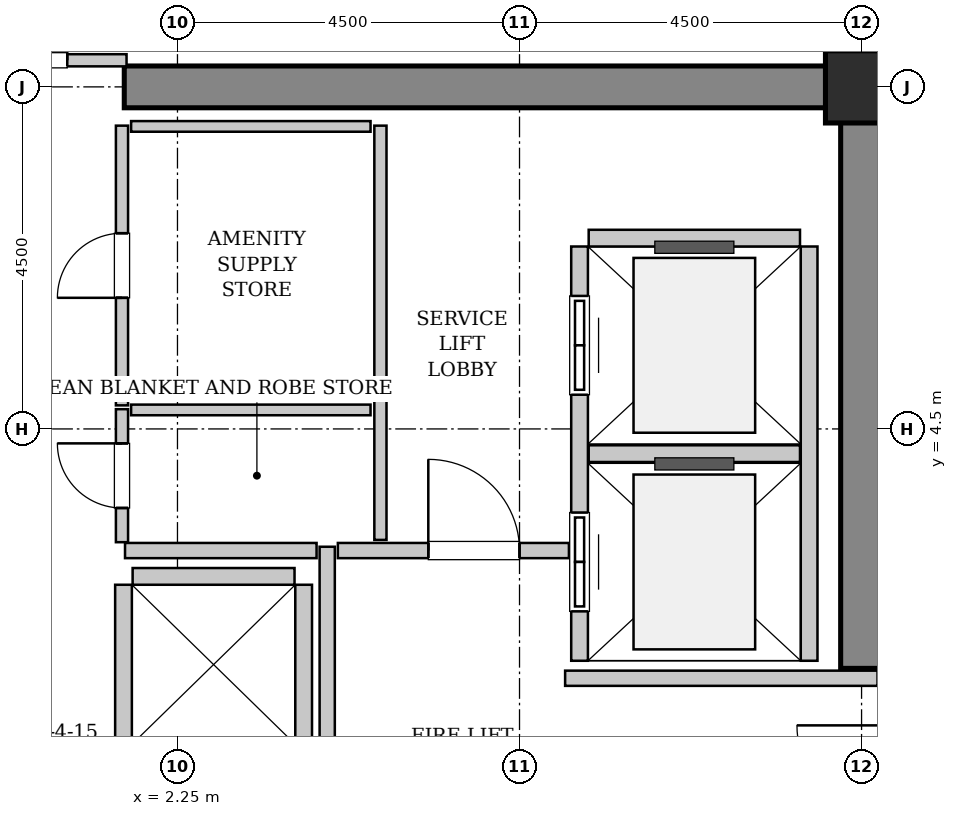
"""IFC4 building model, lengths in metres.
Left out: names, types, materials, properties, quantities, classifications, styles, units other than length and angle.
Written with IfcOpenShell. Run it as: python <this file> out.ifc"""

import sys

from ifc_helpers import new_model, si_unit, direction, frame, frame_2d, origin, origin_2d, place, context, subcontext, project, spatial, rectangle, hollow_rectangle, extrude, source, transform, mapped, element, fill, save


model = new_model("IFC4")
c1 = context("Model", 3, precision=1e-05, world=origin(), true_north=direction((0.0, 1.0)))
c2 = subcontext(c1, "Body", "Model", "MODEL_VIEW")
j1 = project(units=[si_unit("LENGTHUNIT", "METRE"), si_unit("PLANEANGLEUNIT", "RADIAN")], contexts=[c1])
p1 = place(None, origin())
s1 = spatial("IfcSite", under=j1, at=p1, CompositionType="ELEMENT")
p2 = place(p1, origin())
s2 = spatial("IfcBuilding", under=s1, at=p2, CompositionType="ELEMENT")
p3 = place(p2, frame((0.0, 0.0, 171.6)))
s3 = spatial("IfcBuildingStorey", under=s2, at=p3, CompositionType="ELEMENT", Elevation=171.6)
m1 = source(origin(), c2, "Body", "SweptSolid", [
    extrude(rectangle(XDim=9.975, YDim=0.55, at=frame_2d((4.987, 0.0))), origin(), (0.0, 0.0, 1.0), 3.8),
])
p4 = place(p3, frame((1.55, 9.0, 0.0), z_axis=(0.0, 0.0, 1.0), x_axis=(1.0, 0.0, 0.0)))
e1 = element("IfcWall", 1, at=p4, inside=s3, PredefinedType="SHEAR", context=c2, shape_type="MappedRepresentation", body=[
    mapped(m1, transform((0.0, 0.0, 0.0), x_axis=(1.0, 0.0, 0.0), y_axis=(0.0, 1.0, 0.0), z_axis=(0.0, 0.0, 1.0), scale=1.0)),
])
m2 = source(origin(), c2, "Body", "SweptSolid", [
    extrude(rectangle(XDim=7.375, YDim=0.55, at=frame_2d((3.688, 0.0))), origin(), (0.0, 0.0, 1.0), 3.8),
])
p5 = place(p3, frame((11.25, 1.35, 0.0), z_axis=(0.0, 0.0, 1.0), x_axis=(0.0, 1.0, 0.0)))
e2 = element("IfcWall", 2, at=p5, inside=s3, PredefinedType="SHEAR", context=c2, shape_type="MappedRepresentation", body=[
    mapped(m2, transform((0.0, 0.0, 0.0), x_axis=(1.0, 0.0, 0.0), y_axis=(0.0, 1.0, 0.0), z_axis=(0.0, 0.0, 1.0), scale=1.0)),
])
m3 = source(origin(), c2, "Body", "SweptSolid", [
    extrude(hollow_rectangle(XDim=0.95, YDim=0.95, WallThickness=0.045, InnerFilletRadius=0.045, OuterFilletRadius=0.09, at=origin_2d()), origin(), (0.0, 0.0, 1.0), 3.8),
])
p6 = place(p3, frame((11.25, 9.0, 0.0), z_axis=(0.0, 0.0, 1.0), x_axis=(1.0, 0.0, 0.0)))
e3 = element("IfcColumn", 3, at=p6, inside=s3, PredefinedType="COLUMN", context=c2, shape_type="MappedRepresentation", body=[
    mapped(m3, transform((0.0, 0.0, 0.0), x_axis=(1.0, 0.0, 0.0), y_axis=(0.0, 1.0, 0.0), z_axis=(0.0, 0.0, 1.0), scale=1.0)),
])
m4 = source(origin(), c2, "Body", "SweptSolid", [
    extrude(rectangle(XDim=5.45, YDim=0.22, at=frame_2d((2.725, 0.0))), origin(), (0.0, 0.0, 1.0), 3.535),
])
p7 = place(p3, frame((7.54, 6.9, 0.0), z_axis=(0.0, 0.0, 1.0), x_axis=(0.0, -1.0, 0.0)))
e4 = element("IfcWall", 4, at=p7, inside=s3, PredefinedType="SOLIDWALL", context=c2, shape_type="MappedRepresentation", body=[
    mapped(m4, transform((0.0, 0.0, 0.0), x_axis=(1.0, 0.0, 0.0), y_axis=(0.0, 1.0, 0.0), z_axis=(0.0, 0.0, 1.0), scale=1.0)),
])
p8 = place(p7, frame((3.5, 0.0, 0.0)))
e5 = element("IfcOpeningElement", 5, at=p8, cuts=e4, PredefinedType="OPENING", context=c2, shape_type="SweptSolid", body=[
    extrude(rectangle(XDim=1.3, YDim=2.3, at=frame_2d((0.65, 1.15))), frame((0.0, 0.12, 0.0), z_axis=(0.0, -1.0, 0.0), x_axis=(1.0, 0.0, 0.0)), (0.0, 0.0, 1.0), 0.24),
])
p9 = place(p7, frame((0.65, 0.0, 0.0)))
e6 = element("IfcOpeningElement", 6, at=p9, cuts=e4, PredefinedType="OPENING", context=c2, shape_type="SweptSolid", body=[
    extrude(rectangle(XDim=1.3, YDim=2.3, at=frame_2d((0.65, 1.15))), frame((0.0, 0.12, 0.0), z_axis=(0.0, -1.0, 0.0), x_axis=(1.0, 0.0, 0.0)), (0.0, 0.0, 1.0), 0.24),
])
p10 = place(p3, frame((10.56, 1.45, 0.0), z_axis=(0.0, 0.0, 1.0), x_axis=(0.0, 1.0, 0.0)))
e7 = element("IfcWall", 7, at=p10, inside=s3, PredefinedType="SOLIDWALL", context=c2, shape_type="MappedRepresentation", body=[
    mapped(m4, transform((0.0, 0.0, 0.0), x_axis=(1.0, 0.0, 0.0), y_axis=(0.0, 1.0, 0.0), z_axis=(0.0, 0.0, 1.0), scale=1.0)),
])
m5 = source(origin(), c2, "Body", "SweptSolid", [
    extrude(rectangle(XDim=2.78, YDim=0.22, at=frame_2d((1.39, 0.0))), origin(), (0.0, 0.0, 1.0), 3.535),
])
for number, where, z_axis, x_axis in (
    (8, (7.66, 4.175, 0.0), (0.0, 0.0, 1.0), (1.0, 0.0, 0.0)),
    (9, (10.44, 7.01, 0.0), (0.0, 0.0, 1.0), (-1.0, 0.0, 0.0)),
):
    element("IfcWall", number, at=place(p3, frame(where, z_axis=z_axis, x_axis=x_axis)), inside=s3, PredefinedType="SOLIDWALL", context=c2, shape_type="MappedRepresentation", body=[
        mapped(m5, transform((0.0, 0.0, 0.0), x_axis=(1.0, 0.0, 0.0), y_axis=(0.0, 1.0, 0.0), z_axis=(0.0, 0.0, 1.0), scale=1.0)),
    ])
m6 = source(origin(), c2, "Body", "SweptSolid", [
    extrude(rectangle(XDim=4.9, YDim=0.22, at=frame_2d((2.45, 0.0))), origin(), (0.0, 0.0, 1.0), 3.535),
])
for number, where, z_axis, x_axis in (
    (10, (1.54, 2.45, 0.0), (0.0, 0.0, 1.0), (0.0, -1.0, 0.0)),
    (11, (3.91, -2.45, 0.0), (0.0, 0.0, 1.0), (0.0, 1.0, 0.0)),
):
    element("IfcWall", number, at=place(p3, frame(where, z_axis=z_axis, x_axis=x_axis)), inside=s3, PredefinedType="SOLIDWALL", context=c2, shape_type="MappedRepresentation", body=[
        mapped(m6, transform((0.0, 0.0, 0.0), x_axis=(1.0, 0.0, 0.0), y_axis=(0.0, 1.0, 0.0), z_axis=(0.0, 0.0, 1.0), scale=1.0)),
    ])
m7 = source(origin(), c2, "Body", "SweptSolid", [
    extrude(rectangle(XDim=2.13, YDim=0.22, at=frame_2d((1.065, 0.0))), origin(), (0.0, 0.0, 1.0), 3.535),
])
p11 = place(p3, frame((3.79, 2.56, 0.0), z_axis=(0.0, 0.0, 1.0), x_axis=(-1.0, 0.0, 0.0)))
e12 = element("IfcWall", 12, at=p11, inside=s3, PredefinedType="SOLIDWALL", context=c2, shape_type="MappedRepresentation", body=[
    mapped(m7, transform((0.0, 0.0, 0.0), x_axis=(1.0, 0.0, 0.0), y_axis=(0.0, 1.0, 0.0), z_axis=(0.0, 0.0, 1.0), scale=1.0)),
])
m8 = source(origin(), c2, "Body", "SweptSolid", [
    extrude(rectangle(XDim=5.9, YDim=0.2, at=frame_2d((2.95, 0.0))), origin(), (0.0, 0.0, 1.0), 3.535),
])
p12 = place(p3, frame((4.22, -2.95, 0.0), z_axis=(0.0, 0.0, 1.0), x_axis=(0.0, 1.0, 0.0)))
e13 = element("IfcWall", 13, at=p12, inside=s3, PredefinedType="PARTITIONING", context=c2, shape_type="MappedRepresentation", body=[
    mapped(m8, transform((0.0, 0.0, 0.0), x_axis=(1.0, 0.0, 0.0), y_axis=(0.0, 1.0, 0.0), z_axis=(0.0, 0.0, 1.0), scale=1.0)),
])
m9 = source(origin(), c2, "Body", "SweptSolid", [
    extrude(rectangle(XDim=2.52, YDim=0.2, at=frame_2d((1.26, 0.0))), origin(), (0.0, 0.0, 1.0), 3.535),
])
p13 = place(p3, frame((1.56, 2.9, 0.0), z_axis=(0.0, 0.0, 1.0), x_axis=(1.0, 0.0, 0.0)))
e14 = element("IfcWall", 14, at=p13, inside=s3, PredefinedType="PARTITIONING", context=c2, shape_type="MappedRepresentation", body=[
    mapped(m9, transform((0.0, 0.0, 0.0), x_axis=(1.0, 0.0, 0.0), y_axis=(0.0, 1.0, 0.0), z_axis=(0.0, 0.0, 1.0), scale=1.0)),
])
m10 = source(origin(), c2, "Body", "SweptSolid", [
    extrude(rectangle(XDim=3.04, YDim=0.2, at=frame_2d((1.52, 0.0))), origin(), (0.0, 0.0, 1.0), 3.535),
])
p14 = place(p3, frame((4.36, 2.9, 0.0), z_axis=(0.0, 0.0, 1.0), x_axis=(1.0, 0.0, 0.0)))
e15 = element("IfcWall", 15, at=p14, inside=s3, PredefinedType="PARTITIONING", context=c2, shape_type="MappedRepresentation", body=[
    mapped(m10, transform((0.0, 0.0, 0.0), x_axis=(1.0, 0.0, 0.0), y_axis=(0.0, 1.0, 0.0), z_axis=(0.0, 0.0, 1.0), scale=1.0)),
])
p15 = place(p14, frame((1.19, 0.0, 0.0)))
e16 = element("IfcOpeningElement", 16, at=p15, cuts=e15, PredefinedType="OPENING", context=c2, shape_type="SweptSolid", body=[
    extrude(rectangle(XDim=1.2, YDim=2.15, at=frame_2d((0.6, 1.075))), frame((0.0, 0.11, 0.0), z_axis=(0.0, -1.0, 0.0), x_axis=(1.0, 0.0, 0.0)), (0.0, 0.0, 1.0), 0.22),
])
m11 = source(origin(), c2, "Body", "SweptSolid", [
    extrude(rectangle(XDim=4.11, YDim=0.2, at=frame_2d((2.055, 0.0))), origin(), (0.0, 0.0, 1.0), 3.535),
])
p16 = place(p3, frame((7.35, 1.22, 0.0), z_axis=(0.0, 0.0, 1.0), x_axis=(1.0, 0.0, 0.0)))
e17 = element("IfcWall", 17, at=p16, inside=s3, PredefinedType="PARTITIONING", context=c2, shape_type="MappedRepresentation", body=[
    mapped(m11, transform((0.0, 0.0, 0.0), x_axis=(1.0, 0.0, 0.0), y_axis=(0.0, 1.0, 0.0), z_axis=(0.0, 0.0, 1.0), scale=1.0)),
])
m12 = source(origin(), c2, "Body", "SweptSolid", [
    extrude(rectangle(XDim=3.16, YDim=0.16, at=frame_2d((1.58, 0.0))), origin(), (0.0, 0.0, 1.0), 2.425),
])
p17 = place(p3, frame((-1.58, 9.35, 0.0), z_axis=(0.0, 0.0, 1.0), x_axis=(1.0, 0.0, 0.0)))
e18 = element("IfcWall", 18, at=p17, inside=s3, PredefinedType="PARTITIONING", context=c2, shape_type="MappedRepresentation", body=[
    mapped(m12, transform((0.0, 0.0, 0.0), x_axis=(1.0, 0.0, 0.0), y_axis=(0.0, 1.0, 0.0), z_axis=(0.0, 0.0, 1.0), scale=1.0)),
])
p18 = place(p17, frame((0.78, 0.0, 0.0)))
e19 = element("IfcOpeningElement", 19, at=p18, cuts=e18, PredefinedType="OPENING", context=c2, shape_type="SweptSolid", body=[
    extrude(rectangle(XDim=1.6, YDim=2.3, at=frame_2d((0.8, 1.15))), frame((0.0, 0.09, 0.0), z_axis=(0.0, -1.0, 0.0), x_axis=(1.0, 0.0, 0.0)), (0.0, 0.0, 1.0), 0.18),
])
m13 = source(origin(), c2, "Body", "SweptSolid", [
    extrude(rectangle(XDim=5.45, YDim=0.16, at=frame_2d((2.725, 0.0))), origin(), (0.0, 0.0, 1.0), 3.535),
])
p19 = place(p3, frame((4.92, 3.04, 0.0), z_axis=(0.0, 0.0, 1.0), x_axis=(0.0, 1.0, 0.0)))
e20 = element("IfcWall", 20, at=p19, inside=s3, PredefinedType="PARTITIONING", context=c2, shape_type="MappedRepresentation", body=[
    mapped(m13, transform((0.0, 0.0, 0.0), x_axis=(1.0, 0.0, 0.0), y_axis=(0.0, 1.0, 0.0), z_axis=(0.0, 0.0, 1.0), scale=1.0)),
])
m14 = source(origin(), c2, "Body", "SweptSolid", [
    extrude(rectangle(XDim=1.75, YDim=0.16, at=frame_2d((0.875, 0.0))), origin(), (0.0, 0.0, 1.0), 3.535),
])
p20 = place(p3, frame((1.52, 3.01, 0.0), z_axis=(0.0, 0.0, 1.0), x_axis=(0.0, 1.0, 0.0)))
e21 = element("IfcWall", 21, at=p20, inside=s3, PredefinedType="PARTITIONING", context=c2, shape_type="MappedRepresentation", body=[
    mapped(m14, transform((0.0, 0.0, 0.0), x_axis=(1.0, 0.0, 0.0), y_axis=(0.0, 1.0, 0.0), z_axis=(0.0, 0.0, 1.0), scale=1.0)),
])
p21 = place(p20, frame((0.45, 0.0, 0.0)))
e22 = element("IfcOpeningElement", 22, at=p21, cuts=e21, PredefinedType="OPENING", context=c2, shape_type="SweptSolid", body=[
    extrude(rectangle(XDim=0.85, YDim=2.1, at=frame_2d((0.425, 1.05))), frame((0.0, 0.09, 0.0), z_axis=(0.0, -1.0, 0.0), x_axis=(1.0, 0.0, 0.0)), (0.0, 0.0, 1.0), 0.18),
])
m15 = source(origin(), c2, "Body", "SweptSolid", [
    extrude(rectangle(XDim=3.15, YDim=0.14, at=frame_2d((1.575, 0.0))), origin(), (0.0, 0.0, 1.0), 3.535),
])
p22 = place(p3, frame((1.64, 4.75, 0.0), z_axis=(0.0, 0.0, 1.0), x_axis=(1.0, 0.0, 0.0)))
e23 = element("IfcWall", 23, at=p22, inside=s3, PredefinedType="PARTITIONING", context=c2, shape_type="MappedRepresentation", body=[
    mapped(m15, transform((0.0, 0.0, 0.0), x_axis=(1.0, 0.0, 0.0), y_axis=(0.0, 1.0, 0.0), z_axis=(0.0, 0.0, 1.0), scale=1.0)),
])
m16 = source(origin(), c2, "Body", "SweptSolid", [
    extrude(rectangle(XDim=3.68, YDim=0.16, at=frame_2d((1.84, 0.0))), origin(), (0.0, 0.0, 1.0), 3.535),
])
p23 = place(p3, frame((1.52, 4.81, 0.0), z_axis=(0.0, 0.0, 1.0), x_axis=(0.0, 1.0, 0.0)))
e24 = element("IfcWall", 24, at=p23, inside=s3, PredefinedType="PARTITIONING", context=c2, shape_type="MappedRepresentation", body=[
    mapped(m16, transform((0.0, 0.0, 0.0), x_axis=(1.0, 0.0, 0.0), y_axis=(0.0, 1.0, 0.0), z_axis=(0.0, 0.0, 1.0), scale=1.0)),
])
p24 = place(p23, frame((1.415, 0.0, 0.0)))
e25 = element("IfcOpeningElement", 25, at=p24, cuts=e24, PredefinedType="OPENING", context=c2, shape_type="SweptSolid", body=[
    extrude(rectangle(XDim=0.85, YDim=2.1, at=frame_2d((0.425, 1.05))), frame((0.0, 0.09, 0.0), z_axis=(0.0, -1.0, 0.0), x_axis=(1.0, 0.0, 0.0)), (0.0, 0.0, 1.0), 0.18),
])
p25 = place(p3, frame((1.64, 8.48, 0.0), z_axis=(0.0, 0.0, 1.0), x_axis=(1.0, 0.0, 0.0)))
e26 = element("IfcWall", 26, at=p25, inside=s3, PredefinedType="PARTITIONING", context=c2, shape_type="MappedRepresentation", body=[
    mapped(m15, transform((0.0, 0.0, 0.0), x_axis=(1.0, 0.0, 0.0), y_axis=(0.0, 1.0, 0.0), z_axis=(0.0, 0.0, 1.0), scale=1.0)),
])
m17 = source(origin(), c2, "Body", "SweptSolid", [
    extrude(rectangle(XDim=1.3, YDim=2.3, at=frame_2d((0.65, 1.15))), frame((0.0, 0.025, 0.0), z_axis=(0.0, -1.0, 0.0), x_axis=(1.0, 0.0, 0.0)), (0.0, 0.0, 1.0), 0.05),
])
p26 = place(p8, origin())
e27 = element("IfcDoor", 27, at=p26, inside=s3, OperationType="SLIDING_TO_RIGHT", PredefinedType="DOOR", context=c2, shape_type="MappedRepresentation", body=[
    mapped(m17, transform((0.0, 0.0, 0.0), x_axis=(1.0, 0.0, 0.0), y_axis=(0.0, 1.0, 0.0), z_axis=(0.0, 0.0, 1.0), scale=1.0)),
])
fill(e5, e27)
p27 = place(p9, origin())
e28 = element("IfcDoor", 28, at=p27, inside=s3, OperationType="SLIDING_TO_RIGHT", PredefinedType="DOOR", context=c2, shape_type="MappedRepresentation", body=[
    mapped(m17, transform((0.0, 0.0, 0.0), x_axis=(1.0, 0.0, 0.0), y_axis=(0.0, 1.0, 0.0), z_axis=(0.0, 0.0, 1.0), scale=1.0)),
])
fill(e6, e28)
m18 = source(origin(), c2, "Body", "SweptSolid", [
    extrude(rectangle(XDim=1.2, YDim=2.15, at=frame_2d((0.6, 1.075))), frame((0.0, 0.025, 0.0), z_axis=(0.0, -1.0, 0.0), x_axis=(1.0, 0.0, 0.0)), (0.0, 0.0, 1.0), 0.05),
])
p28 = place(p15, origin())
e29 = element("IfcDoor", 29, at=p28, inside=s3, OperationType="SINGLE_SWING_LEFT", PredefinedType="DOOR", context=c2, shape_type="MappedRepresentation", body=[
    mapped(m18, transform((0.0, 0.0, 0.0), x_axis=(1.0, 0.0, 0.0), y_axis=(0.0, 1.0, 0.0), z_axis=(0.0, 0.0, 1.0), scale=1.0)),
])
fill(e16, e29)
m19 = source(origin(), c2, "Body", "SweptSolid", [
    extrude(rectangle(XDim=1.6, YDim=2.3, at=frame_2d((0.8, 1.15))), frame((0.0, 0.025, 0.0), z_axis=(0.0, -1.0, 0.0), x_axis=(1.0, 0.0, 0.0)), (0.0, 0.0, 1.0), 0.05),
])
p29 = place(p18, origin())
e30 = element("IfcDoor", 30, at=p29, inside=s3, OperationType="DOUBLE_DOOR_SINGLE_SWING", PredefinedType="DOOR", context=c2, shape_type="MappedRepresentation", body=[
    mapped(m19, transform((0.0, 0.0, 0.0), x_axis=(1.0, 0.0, 0.0), y_axis=(0.0, 1.0, 0.0), z_axis=(0.0, 0.0, 1.0), scale=1.0)),
])
fill(e19, e30)
m20 = source(origin(), c2, "Body", "SweptSolid", [
    extrude(rectangle(XDim=0.85, YDim=2.1, at=frame_2d((0.425, 1.05))), frame((0.0, 0.025, 0.0), z_axis=(0.0, -1.0, 0.0), x_axis=(1.0, 0.0, 0.0)), (0.0, 0.0, 1.0), 0.05),
])
p30 = place(p21, origin())
e31 = element("IfcDoor", 31, at=p30, inside=s3, OperationType="SINGLE_SWING_RIGHT", PredefinedType="DOOR", context=c2, shape_type="MappedRepresentation", body=[
    mapped(m20, transform((0.0, 0.0, 0.0), x_axis=(1.0, 0.0, 0.0), y_axis=(0.0, 1.0, 0.0), z_axis=(0.0, 0.0, 1.0), scale=1.0)),
])
fill(e22, e31)
p31 = place(p24, origin())
e32 = element("IfcDoor", 32, at=p31, inside=s3, OperationType="SINGLE_SWING_LEFT", PredefinedType="DOOR", context=c2, shape_type="MappedRepresentation", body=[
    mapped(m20, transform((0.0, 0.0, 0.0), x_axis=(1.0, 0.0, 0.0), y_axis=(0.0, 1.0, 0.0), z_axis=(0.0, 0.0, 1.0), scale=1.0)),
])
fill(e25, e32)
save(model, sys.argv[1])
